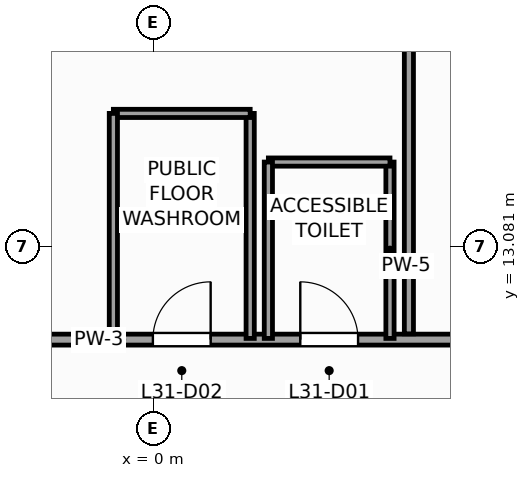
"""IFC4 building model, lengths in metres.
Left out: names, types, materials, properties, quantities, classifications, styles, units other than length and angle.
Written with IfcOpenShell. Run it as: python <this file> out.ifc"""

import sys

from ifc_helpers import new_model, si_unit, direction, frame, frame_2d, origin, place, context, subcontext, project, spatial, rectangle, extrude, source, transform, mapped, element, fill, save


model = new_model("IFC4")
c1 = context("Model", 3, precision=1e-05, world=origin(), true_north=direction((0.0, 1.0)))
c2 = subcontext(c1, "Body", "Model", "MODEL_VIEW")
j1 = project(units=[si_unit("LENGTHUNIT", "METRE"), si_unit("PLANEANGLEUNIT", "RADIAN")], contexts=[c1])
p1 = place(None, origin())
s1 = spatial("IfcSite", under=j1, at=p1, CompositionType="ELEMENT")
p2 = place(p1, origin())
s2 = spatial("IfcBuilding", under=s1, at=p2, CompositionType="ELEMENT")
p3 = place(p2, frame((0.0, 0.0, 131.2)))
s3 = spatial("IfcBuildingStorey", under=s2, at=p3, CompositionType="ELEMENT", Elevation=131.2)
p4 = place(p3, frame((-12.6, 11.55, 0.0), z_axis=(0.0, 0.0, 1.0), x_axis=(1.0, 0.0, 0.0)))
e1 = element("IfcWall", 1, at=p4, inside=s3, PredefinedType="PARTITIONING", context=c2, shape_type="SweptSolid", body=[
    extrude(rectangle(XDim=24.15, YDim=0.18, at=frame_2d((12.075, 0.0))), origin(), (0.0, 0.0, 1.0), 3.74),
])
p5 = place(p4, frame((15.014, 0.0, 0.0)))
e2 = element("IfcOpeningElement", 2, at=p5, cuts=e1, PredefinedType="OPENING", context=c2, shape_type="SweptSolid", body=[
    extrude(rectangle(XDim=0.95, YDim=2.1, at=frame_2d((0.475, 1.05))), frame((0.0, 0.1, 0.0), z_axis=(0.0, -1.0, 0.0), x_axis=(1.0, 0.0, 0.0)), (0.0, 0.0, 1.0), 0.2),
])
p6 = place(p4, frame((12.59, 0.0, 0.0)))
e3 = element("IfcOpeningElement", 3, at=p6, cuts=e1, PredefinedType="OPENING", context=c2, shape_type="SweptSolid", body=[
    extrude(rectangle(XDim=0.95, YDim=2.1, at=frame_2d((0.475, 1.05))), frame((0.0, 0.1, 0.0), z_axis=(0.0, -1.0, 0.0), x_axis=(1.0, 0.0, 0.0)), (0.0, 0.0, 1.0), 0.2),
])
p7 = place(p3, frame((4.2, 11.645, 0.0), z_axis=(0.0, 0.0, 1.0), x_axis=(0.0, 1.0, 0.0)))
e4 = element("IfcWall", 4, at=p7, inside=s3, PredefinedType="PARTITIONING", context=c2, shape_type="SweptSolid", body=[
    extrude(rectangle(XDim=17.805, YDim=0.15, at=frame_2d((8.902, 0.0))), origin(), (0.0, 0.0, 1.0), 3.74),
])
p8 = place(p3, frame((3.889, 11.57, 0.0), z_axis=(0.0, 0.0, 1.0), x_axis=(0.0, 1.0, 0.0)))
e5 = element("IfcWall", 5, at=p8, inside=s3, PredefinedType="PARTITIONING", context=c2, shape_type="SweptSolid", body=[
    extrude(rectangle(XDim=2.9, YDim=0.135, at=frame_2d((1.45, 0.0))), origin(), (0.0, 0.0, 1.0), 3.74),
])
p9 = place(p3, frame((1.889, 14.47, 0.0), z_axis=(0.0, 0.0, 1.0), x_axis=(1.0, 0.0, 0.0)))
e6 = element("IfcWall", 6, at=p9, inside=s3, PredefinedType="PARTITIONING", context=c2, shape_type="SweptSolid", body=[
    extrude(rectangle(XDim=2.0, YDim=0.135, at=frame_2d((1.0, 0.0))), origin(), (0.0, 0.0, 1.0), 3.74),
])
p10 = place(p3, frame((1.889, 11.57, 0.0), z_axis=(0.0, 0.0, 1.0), x_axis=(0.0, 1.0, 0.0)))
e7 = element("IfcWall", 7, at=p10, inside=s3, PredefinedType="PARTITIONING", context=c2, shape_type="SweptSolid", body=[
    extrude(rectangle(XDim=2.9, YDim=0.135, at=frame_2d((1.45, 0.0))), origin(), (0.0, 0.0, 1.0), 3.74),
])
p11 = place(p3, frame((1.59, 11.57, 0.0), z_axis=(0.0, 0.0, 1.0), x_axis=(0.0, 1.0, 0.0)))
e8 = element("IfcWall", 8, at=p11, inside=s3, PredefinedType="PARTITIONING", context=c2, shape_type="SweptSolid", body=[
    extrude(rectangle(XDim=3.7, YDim=0.135, at=frame_2d((1.85, 0.0))), origin(), (0.0, 0.0, 1.0), 3.74),
])
p12 = place(p3, frame((-0.66, 15.27, 0.0), z_axis=(0.0, 0.0, 1.0), x_axis=(1.0, 0.0, 0.0)))
e9 = element("IfcWall", 9, at=p12, inside=s3, PredefinedType="PARTITIONING", context=c2, shape_type="SweptSolid", body=[
    extrude(rectangle(XDim=2.25, YDim=0.135, at=frame_2d((1.125, 0.0))), origin(), (0.0, 0.0, 1.0), 3.24),
])
p13 = place(p3, frame((-0.66, 11.57, 0.0), z_axis=(0.0, 0.0, 1.0), x_axis=(0.0, 1.0, 0.0)))
e10 = element("IfcWall", 10, at=p13, inside=s3, PredefinedType="PARTITIONING", context=c2, shape_type="SweptSolid", body=[
    extrude(rectangle(XDim=3.7, YDim=0.135, at=frame_2d((1.85, 0.0))), origin(), (0.0, 0.0, 1.0), 3.74),
])
m1 = source(origin(), c2, "Body", "SweptSolid", [
    extrude(rectangle(XDim=0.95, YDim=2.1, at=frame_2d((0.475, 1.05))), frame((0.0, 0.025, 0.0), z_axis=(0.0, -1.0, 0.0), x_axis=(1.0, 0.0, 0.0)), (0.0, 0.0, 1.0), 0.05),
])
p14 = place(p5, origin())
e11 = element("IfcDoor", 11, at=p14, inside=s3, OperationType="SINGLE_SWING_LEFT", PredefinedType="DOOR", context=c2, shape_type="MappedRepresentation", body=[
    mapped(m1, transform((0.0, 0.0, 0.0), scale=1.0)),
])
fill(e2, e11)
p15 = place(p6, origin())
e12 = element("IfcDoor", 12, at=p15, inside=s3, OperationType="SINGLE_SWING_RIGHT", PredefinedType="DOOR", context=c2, shape_type="MappedRepresentation", body=[
    mapped(m1, transform((0.0, 0.0, 0.0), scale=1.0)),
])
fill(e3, e12)
save(model, sys.argv[1])
